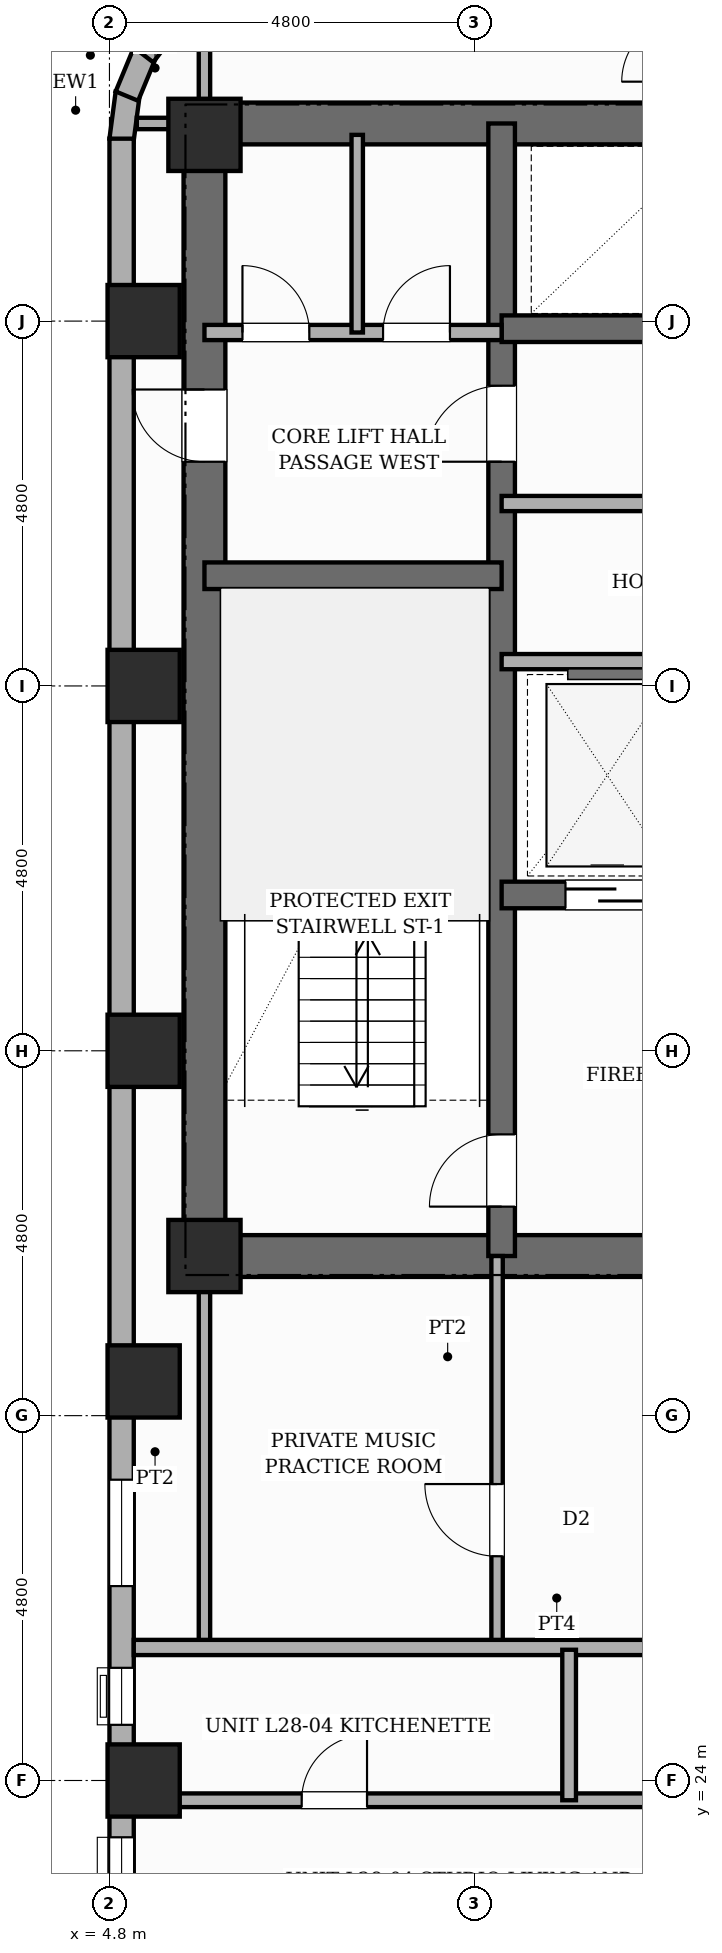
"""IFC4 building model, lengths in metres.
Left out: names, types, materials, properties, quantities, classifications, styles, units other than length and angle.
Written with IfcOpenShell. Run it as: python <this file> out.ifc"""

import sys

from ifc_helpers import new_model, si_unit, direction, frame, frame_2d, origin, origin_2d, place, context, subcontext, project, spatial, rectangle, extrude, element, fill, save


model = new_model("IFC4")
c1 = context("Model", 3, precision=1e-05, world=origin(), true_north=direction((0.0, 1.0)))
c2 = subcontext(c1, "Body", "Model", "MODEL_VIEW")
j1 = project(units=[si_unit("LENGTHUNIT", "METRE"), si_unit("PLANEANGLEUNIT", "RADIAN")], contexts=[c1])
p1 = place(None, origin())
s1 = spatial("IfcSite", under=j1, at=p1, CompositionType="ELEMENT")
p2 = place(p1, origin())
s2 = spatial("IfcBuilding", under=s1, at=p2, CompositionType="ELEMENT")
p3 = place(p2, frame((0.0, 0.0, 110.8)))
s3 = spatial("IfcBuildingStorey", under=s2, at=p3, CompositionType="ELEMENT", Elevation=110.8)
p4 = place(p3, frame((6.05, 30.625, 0.0), z_axis=(0.0, 0.0, 1.0), x_axis=(0.0, 1.0, 0.0)))
e1 = element("IfcWall", 1, at=p4, inside=s3, PredefinedType="SHEAR", context=c2, shape_type="SweptSolid", body=[
    extrude(rectangle(XDim=15.45, YDim=0.55, at=frame_2d((7.725, 0.0))), origin(), (0.0, 0.0, 1.0), 3.6),
])
p5 = place(p4, frame((10.725, 0.0, 0.0)))
e2 = element("IfcOpeningElement", 2, at=p5, cuts=e1, PredefinedType="OPENING", context=c2, shape_type="SweptSolid", body=[
    extrude(rectangle(XDim=0.95, YDim=2.15, at=frame_2d((0.475, 1.075))), frame((0.0, 0.285, 0.0), z_axis=(0.0, -1.0, 0.0), x_axis=(1.0, 0.0, 0.0)), (0.0, 0.0, 1.0), 0.57),
])
p6 = place(p3, frame((6.05, 45.8, 0.0), z_axis=(0.0, 0.0, 1.0), x_axis=(1.0, 0.0, 0.0)))
e3 = element("IfcWall", 3, at=p6, inside=s3, PredefinedType="SHEAR", context=c2, shape_type="SweptSolid", body=[
    extrude(rectangle(XDim=16.7, YDim=0.55, at=frame_2d((8.35, 0.0))), origin(), (0.0, 0.0, 1.0), 3.6),
])
p7 = place(p3, frame((6.05, 30.9, 0.0), z_axis=(0.0, 0.0, 1.0), x_axis=(1.0, 0.0, 0.0)))
e4 = element("IfcWall", 4, at=p7, inside=s3, PredefinedType="SHEAR", context=c2, shape_type="SweptSolid", body=[
    extrude(rectangle(XDim=3.91, YDim=0.55, at=frame_2d((1.955, 0.0))), origin(), (0.0, 0.0, 1.0), 3.6),
])
p8 = place(p3, frame((9.96, 30.9, 0.0), z_axis=(0.0, 0.0, 1.0), x_axis=(1.0, 0.0, 0.0)))
e5 = element("IfcWall", 5, at=p8, inside=s3, PredefinedType="SHEAR", context=c2, shape_type="SweptSolid", body=[
    extrude(rectangle(XDim=8.88, YDim=0.55, at=frame_2d((4.44, 0.0))), origin(), (0.0, 0.0, 1.0), 3.6),
])
p9 = place(p8, frame((4.09, 0.0, 0.0)))
e6 = element("IfcOpeningElement", 6, at=p9, cuts=e5, PredefinedType="OPENING", context=c2, shape_type="SweptSolid", body=[
    extrude(rectangle(XDim=1.0, YDim=2.15, at=frame_2d((0.5, 1.075))), frame((0.0, 0.285, 0.0), z_axis=(0.0, -1.0, 0.0), x_axis=(1.0, 0.0, 0.0)), (0.0, 0.0, 1.0), 0.57),
])
p10 = place(p3, frame((9.96, 30.9, 0.0), z_axis=(0.0, 0.0, 1.0), x_axis=(0.0, 1.0, 0.0)))
e7 = element("IfcWall", 7, at=p10, inside=s3, PredefinedType="SHEAR", context=c2, shape_type="SweptSolid", body=[
    extrude(rectangle(XDim=14.9, YDim=0.35, at=frame_2d((7.45, 0.0))), origin(), (0.0, 0.0, 1.0), 3.6),
])
p11 = place(p10, frame((0.65, 0.0, 0.0)))
e8 = element("IfcOpeningElement", 8, at=p11, cuts=e7, PredefinedType="OPENING", context=c2, shape_type="SweptSolid", body=[
    extrude(rectangle(XDim=0.95, YDim=2.1, at=frame_2d((0.475, 1.05))), frame((0.0, 0.185, 0.0), z_axis=(0.0, -1.0, 0.0), x_axis=(1.0, 0.0, 0.0)), (0.0, 0.0, 1.0), 0.37),
])
p12 = place(p10, frame((10.45, 0.0, 0.0)))
e9 = element("IfcOpeningElement", 9, at=p12, cuts=e7, PredefinedType="OPENING", context=c2, shape_type="SweptSolid", body=[
    extrude(rectangle(XDim=1.0, YDim=2.15, at=frame_2d((0.5, 1.075))), frame((0.0, 0.185, 0.0), z_axis=(0.0, -1.0, 0.0), x_axis=(1.0, 0.0, 0.0)), (0.0, 0.0, 1.0), 0.37),
])
p13 = place(p3, frame((6.05, 39.85, 0.0), z_axis=(0.0, 0.0, 1.0), x_axis=(1.0, 0.0, 0.0)))
e10 = element("IfcWall", 10, at=p13, inside=s3, PredefinedType="SHEAR", context=c2, shape_type="SweptSolid", body=[
    extrude(rectangle(XDim=3.91, YDim=0.35, at=frame_2d((1.955, 0.0))), origin(), (0.0, 0.0, 1.0), 3.6),
])
p14 = place(p3, frame((9.96, 35.65, 0.0), z_axis=(0.0, 0.0, 1.0), x_axis=(1.0, 0.0, 0.0)))
e11 = element("IfcWall", 11, at=p14, inside=s3, PredefinedType="SHEAR", context=c2, shape_type="SweptSolid", body=[
    extrude(rectangle(XDim=8.88, YDim=0.35, at=frame_2d((4.44, 0.0))), origin(), (0.0, 0.0, 1.0), 3.6),
])
p15 = place(p14, frame((0.84, 0.0, 0.0)))
e12 = element("IfcOpeningElement", 12, at=p15, cuts=e11, PredefinedType="OPENING", context=c2, shape_type="SweptSolid", body=[
    extrude(rectangle(XDim=1.1, YDim=2.15, at=frame_2d((0.55, 1.075))), frame((0.0, 0.185, 0.0), z_axis=(0.0, -1.0, 0.0), x_axis=(1.0, 0.0, 0.0)), (0.0, 0.0, 1.0), 0.37),
])
p16 = place(p14, frame((5.24, 0.0, 0.0)))
e13 = element("IfcOpeningElement", 13, at=p16, cuts=e11, PredefinedType="OPENING", context=c2, shape_type="SweptSolid", body=[
    extrude(rectangle(XDim=1.1, YDim=2.15, at=frame_2d((0.55, 1.075))), frame((0.0, 0.185, 0.0), z_axis=(0.0, -1.0, 0.0), x_axis=(1.0, 0.0, 0.0)), (0.0, 0.0, 1.0), 0.37),
])
p17 = place(p14, frame((7.5, 0.0, 0.0)))
e14 = element("IfcOpeningElement", 14, at=p17, cuts=e11, PredefinedType="OPENING", context=c2, shape_type="SweptSolid", body=[
    extrude(rectangle(XDim=0.88, YDim=2.1, at=frame_2d((0.44, 1.05))), frame((0.0, 0.185, 0.0), z_axis=(0.0, -1.0, 0.0), x_axis=(1.0, 0.0, 0.0)), (0.0, 0.0, 1.0), 0.37),
])
p18 = place(p3, frame((9.96, 43.1, 0.0), z_axis=(0.0, 0.0, 1.0), x_axis=(1.0, 0.0, 0.0)))
e15 = element("IfcWall", 15, at=p18, inside=s3, PredefinedType="SHEAR", context=c2, shape_type="SweptSolid", body=[
    extrude(rectangle(XDim=8.88, YDim=0.35, at=frame_2d((4.44, 0.0))), origin(), (0.0, 0.0, 1.0), 3.6),
])
for number, where, z_axis, x_axis in (
    (16, (5.25, 24.0, 0.0), (0.0, 0.0, 1.0), (1.0, 0.0, 0.0)),
    (17, (5.25, 29.25, 0.0), (0.0, 0.0, 1.0), (1.0, 0.0, 0.0)),
    (18, (5.25, 33.6, 0.0), (0.0, 0.0, 1.0), (1.0, 0.0, 0.0)),
    (19, (5.25, 38.4, 0.0), (0.0, 0.0, 1.0), (1.0, 0.0, 0.0)),
    (20, (5.25, 43.2, 0.0), (0.0, 0.0, 1.0), (1.0, 0.0, 0.0)),
    (21, (6.05, 30.9, 0.0), (0.0, 0.0, 1.0), (1.0, 0.0, 0.0)),
    (22, (6.05, 45.65, 0.0), (0.0, 0.0, 1.0), (1.0, 0.0, 0.0)),
):
    element("IfcColumn", number, at=place(p3, frame(where, z_axis=z_axis, x_axis=x_axis)), inside=s3, PredefinedType="COLUMN", context=c2, shape_type="SweptSolid", body=[
        extrude(rectangle(XDim=0.95, YDim=0.95, at=origin_2d()), origin(), (0.0, 0.0, 1.0), 3.6),
    ])
for number, where, z_axis, x_axis in (
    (23, (4.958, 45.579, 0.0), (0.0, 0.0, 1.0), (0.131, 0.991, 0.0)),
    (24, (5.03, 46.16, 0.0), (0.0, 0.0, 1.0), (0.383, 0.924, 0.0)),
):
    element("IfcWall", number, at=place(p3, frame(where, z_axis=z_axis, x_axis=x_axis)), inside=s3, PredefinedType="STANDARD", context=c2, shape_type="SweptSolid", body=[
        extrude(rectangle(XDim=0.626, YDim=0.32, at=frame_2d((0.313, 0.0))), origin(), (0.0, 0.0, 1.0), 3.36),
    ])
p19 = place(p3, frame((5.248, 46.703, 0.0), z_axis=(0.0, 0.0, 1.0), x_axis=(0.608938521285, 0.7932174212, 0.0)))
e25 = element("IfcWall", 25, at=p19, inside=s3, PredefinedType="STANDARD", context=c2, shape_type="SweptSolid", body=[
    extrude(rectangle(XDim=0.627, YDim=0.32, at=frame_2d((0.313, 0.0))), origin(), (0.0, 0.0, 1.0), 3.36),
])
p20 = place(p3, frame((4.96, 12.0, 0.0), z_axis=(0.0, 0.0, 1.0), x_axis=(0.0, 1.0, 0.0)))
e26 = element("IfcWall", 26, at=p20, inside=s3, PredefinedType="STANDARD", context=c2, shape_type="SweptSolid", body=[
    extrude(rectangle(XDim=33.6, YDim=0.32, at=frame_2d((16.8, 0.0))), origin(), (0.0, 0.0, 1.0), 2.54),
])
p21 = place(p20, frame((4.25, 0.0, 0.0)))
e27 = element("IfcOpeningElement", 27, at=p21, cuts=e26, PredefinedType="OPENING", context=c2, shape_type="SweptSolid", body=[
    extrude(rectangle(XDim=1.1, YDim=2.15, at=frame_2d((0.55, 1.075))), frame((0.0, 0.17, 0.0), z_axis=(0.0, -1.0, 0.0), x_axis=(1.0, 0.0, 0.0)), (0.0, 0.0, 1.0), 0.34),
])
p22 = place(p20, frame((3.153, 0.0, 0.45)))
e28 = element("IfcOpeningElement", 28, at=p22, cuts=e26, PredefinedType="OPENING", context=c2, shape_type="SweptSolid", body=[
    extrude(rectangle(XDim=0.6, YDim=1.8, at=frame_2d((0.3, 0.9))), frame((0.0, 0.17, 0.0), z_axis=(0.0, -1.0, 0.0), x_axis=(1.0, 0.0, 0.0)), (0.0, 0.0, 1.0), 0.34),
])
p23 = place(p20, frame((5.853, 0.0, 0.45)))
e29 = element("IfcOpeningElement", 29, at=p23, cuts=e26, PredefinedType="OPENING", context=c2, shape_type="SweptSolid", body=[
    extrude(rectangle(XDim=0.6, YDim=1.8, at=frame_2d((0.3, 0.9))), frame((0.0, 0.17, 0.0), z_axis=(0.0, -1.0, 0.0), x_axis=(1.0, 0.0, 0.0)), (0.0, 0.0, 1.0), 0.34),
])
p24 = place(p20, frame((9.853, 0.0, 0.65)))
e30 = element("IfcOpeningElement", 30, at=p24, cuts=e26, PredefinedType="OPENING", context=c2, shape_type="SweptSolid", body=[
    extrude(rectangle(XDim=1.4, YDim=1.1, at=frame_2d((0.7, 0.55))), frame((0.0, 0.17, 0.0), z_axis=(0.0, -1.0, 0.0), x_axis=(1.0, 0.0, 0.0)), (0.0, 0.0, 1.0), 0.34),
])
p25 = place(p20, frame((0.355, 0.0, 0.45)))
e31 = element("IfcOpeningElement", 31, at=p25, cuts=e26, PredefinedType="OPENING", context=c2, shape_type="SweptSolid", body=[
    extrude(rectangle(XDim=0.95, YDim=1.8, at=frame_2d((0.475, 0.9))), frame((0.0, 0.17, 0.0), z_axis=(0.0, -1.0, 0.0), x_axis=(1.0, 0.0, 0.0)), (0.0, 0.0, 1.0), 0.34),
])
p26 = place(p20, frame((8.33, 0.0, 0.45)))
e32 = element("IfcOpeningElement", 32, at=p26, cuts=e26, PredefinedType="OPENING", context=c2, shape_type="SweptSolid", body=[
    extrude(rectangle(XDim=0.95, YDim=1.8, at=frame_2d((0.475, 0.9))), frame((0.0, 0.17, 0.0), z_axis=(0.0, -1.0, 0.0), x_axis=(1.0, 0.0, 0.0)), (0.0, 0.0, 1.0), 0.34),
])
p27 = place(p20, frame((12.732, 0.0, 0.45)))
e33 = element("IfcOpeningElement", 33, at=p27, cuts=e26, PredefinedType="OPENING", context=c2, shape_type="SweptSolid", body=[
    extrude(rectangle(XDim=0.75, YDim=1.8, at=frame_2d((0.375, 0.9))), frame((0.0, 0.17, 0.0), z_axis=(0.0, -1.0, 0.0), x_axis=(1.0, 0.0, 0.0)), (0.0, 0.0, 1.0), 0.34),
])
p28 = place(p20, frame((14.558, 0.0, 0.65)))
e34 = element("IfcOpeningElement", 34, at=p28, cuts=e26, PredefinedType="OPENING", context=c2, shape_type="SweptSolid", body=[
    extrude(rectangle(XDim=1.4, YDim=1.1, at=frame_2d((0.7, 0.55))), frame((0.0, 0.17, 0.0), z_axis=(0.0, -1.0, 0.0), x_axis=(1.0, 0.0, 0.0)), (0.0, 0.0, 1.0), 0.34),
])
p29 = place(p3, frame((9.96, 38.72, 0.0), z_axis=(0.0, 0.0, 1.0), x_axis=(1.0, 0.0, 0.0)))
e35 = element("IfcWall", 35, at=p29, inside=s3, PredefinedType="POLYGONAL", context=c2, shape_type="SweptSolid", body=[
    extrude(rectangle(XDim=7.06, YDim=0.2, at=frame_2d((3.53, 0.0))), origin(), (0.0, 0.0, 1.0), 3.36),
])
p30 = place(p3, frame((9.96, 40.8, 0.0), z_axis=(0.0, 0.0, 1.0), x_axis=(1.0, 0.0, 0.0)))
e36 = element("IfcWall", 36, at=p30, inside=s3, PredefinedType="POLYGONAL", context=c2, shape_type="SweptSolid", body=[
    extrude(rectangle(XDim=8.88, YDim=0.2, at=frame_2d((4.44, 0.0))), origin(), (0.0, 0.0, 1.0), 3.36),
])
p31 = place(p30, frame((7.5, 0.0, 0.0)))
e37 = element("IfcOpeningElement", 37, at=p31, cuts=e36, PredefinedType="OPENING", context=c2, shape_type="SweptSolid", body=[
    extrude(rectangle(XDim=0.88, YDim=2.1, at=frame_2d((0.44, 1.05))), frame((0.0, 0.11, 0.0), z_axis=(0.0, -1.0, 0.0), x_axis=(1.0, 0.0, 0.0)), (0.0, 0.0, 1.0), 0.22),
])
p32 = place(p30, frame((3.6, 0.0, 0.0)))
e38 = element("IfcOpeningElement", 38, at=p32, cuts=e36, PredefinedType="OPENING", context=c2, shape_type="SweptSolid", body=[
    extrude(rectangle(XDim=0.88, YDim=2.1, at=frame_2d((0.44, 1.05))), frame((0.0, 0.11, 0.0), z_axis=(0.0, -1.0, 0.0), x_axis=(1.0, 0.0, 0.0)), (0.0, 0.0, 1.0), 0.22),
])
p33 = place(p3, frame((6.05, 43.05, 0.0), z_axis=(0.0, 0.0, 1.0), x_axis=(1.0, 0.0, 0.0)))
e39 = element("IfcWall", 39, at=p33, inside=s3, PredefinedType="POLYGONAL", context=c2, shape_type="SweptSolid", body=[
    extrude(rectangle(XDim=3.91, YDim=0.2, at=frame_2d((1.955, 0.0))), origin(), (0.0, 0.0, 1.0), 2.54),
])
p34 = place(p33, frame((0.5, 0.0, 0.0)))
e40 = element("IfcOpeningElement", 40, at=p34, cuts=e39, PredefinedType="OPENING", context=c2, shape_type="SweptSolid", body=[
    extrude(rectangle(XDim=0.88, YDim=2.1, at=frame_2d((0.44, 1.05))), frame((0.0, 0.11, 0.0), z_axis=(0.0, -1.0, 0.0), x_axis=(1.0, 0.0, 0.0)), (0.0, 0.0, 1.0), 0.22),
])
p35 = place(p33, frame((2.35, 0.0, 0.0)))
e41 = element("IfcOpeningElement", 41, at=p35, cuts=e39, PredefinedType="OPENING", context=c2, shape_type="SweptSolid", body=[
    extrude(rectangle(XDim=0.88, YDim=2.1, at=frame_2d((0.44, 1.05))), frame((0.0, 0.11, 0.0), z_axis=(0.0, -1.0, 0.0), x_axis=(1.0, 0.0, 0.0)), (0.0, 0.0, 1.0), 0.22),
])
p36 = place(p3, frame((8.06, 43.05, 0.0), z_axis=(0.0, 0.0, 1.0), x_axis=(0.0, 1.0, 0.0)))
e42 = element("IfcWall", 42, at=p36, inside=s3, PredefinedType="PARTITIONING", context=c2, shape_type="SweptSolid", body=[
    extrude(rectangle(XDim=2.6, YDim=0.15, at=frame_2d((1.3, 0.0))), origin(), (0.0, 0.0, 1.0), 3.36),
])
p37 = place(p3, frame((6.05, 25.75, 0.0), z_axis=(0.0, 0.0, 1.0), x_axis=(0.0, 1.0, 0.0)))
e43 = element("IfcWall", 43, at=p37, inside=s3, PredefinedType="PARTITIONING", context=c2, shape_type="SweptSolid", body=[
    extrude(rectangle(XDim=5.15, YDim=0.15, at=frame_2d((2.575, 0.0))), origin(), (0.0, 0.0, 1.0), 3.36),
])
p38 = place(p3, frame((9.9, 25.75, 0.0), z_axis=(0.0, 0.0, 1.0), x_axis=(0.0, 1.0, 0.0)))
e44 = element("IfcWall", 44, at=p38, inside=s3, PredefinedType="PARTITIONING", context=c2, shape_type="SweptSolid", body=[
    extrude(rectangle(XDim=5.15, YDim=0.15, at=frame_2d((2.575, 0.0))), origin(), (0.0, 0.0, 1.0), 3.36),
])
p39 = place(p38, frame((1.2, 0.0, 0.0)))
e45 = element("IfcOpeningElement", 45, at=p39, cuts=e44, PredefinedType="OPENING", context=c2, shape_type="SweptSolid", body=[
    extrude(rectangle(XDim=0.95, YDim=2.15, at=frame_2d((0.475, 1.075))), frame((0.0, 0.085, 0.0), z_axis=(0.0, -1.0, 0.0), x_axis=(1.0, 0.0, 0.0)), (0.0, 0.0, 1.0), 0.17),
])
p40 = place(p3, frame((5.12, 25.75, 0.0), z_axis=(0.0, 0.0, 1.0), x_axis=(1.0, 0.0, 0.0)))
e46 = element("IfcWall", 46, at=p40, inside=s3, PredefinedType="PARTITIONING", context=c2, shape_type="SweptSolid", body=[
    extrude(rectangle(XDim=11.13, YDim=0.2, at=frame_2d((5.565, 0.0))), origin(), (0.0, 0.0, 1.0), 3.36),
])
p41 = place(p3, frame((5.12, 23.74, 0.0), z_axis=(0.0, 0.0, 1.0), x_axis=(1.0, 0.0, 0.0)))
e47 = element("IfcWall", 47, at=p41, inside=s3, PredefinedType="PLUMBINGWALL", context=c2, shape_type="SweptSolid", body=[
    extrude(rectangle(XDim=11.07, YDim=0.18, at=frame_2d((5.535, 0.0))), origin(), (0.0, 0.0, 1.0), 2.54),
])
p42 = place(p41, frame((2.209, 0.0, 0.0)))
e48 = element("IfcOpeningElement", 48, at=p42, cuts=e47, PredefinedType="OPENING", context=c2, shape_type="SweptSolid", body=[
    extrude(rectangle(XDim=0.86, YDim=2.1, at=frame_2d((0.43, 1.05))), frame((0.0, 0.1, 0.0), z_axis=(0.0, -1.0, 0.0), x_axis=(1.0, 0.0, 0.0)), (0.0, 0.0, 1.0), 0.2),
])
p43 = place(p41, frame((7.824, 0.0, 0.0)))
e49 = element("IfcOpeningElement", 49, at=p43, cuts=e47, PredefinedType="OPENING", context=c2, shape_type="SweptSolid", body=[
    extrude(rectangle(XDim=0.86, YDim=2.1, at=frame_2d((0.43, 1.05))), frame((0.0, 0.1, 0.0), z_axis=(0.0, -1.0, 0.0), x_axis=(1.0, 0.0, 0.0)), (0.0, 0.0, 1.0), 0.2),
])
p44 = place(p3, frame((10.848, 23.74, 0.0), z_axis=(0.0, 0.0, 1.0), x_axis=(0.0, 1.0, 0.0)))
e50 = element("IfcWall", 50, at=p44, inside=s3, PredefinedType="PLUMBINGWALL", context=c2, shape_type="SweptSolid", body=[
    extrude(rectangle(XDim=1.98, YDim=0.18, at=frame_2d((0.99, 0.0))), origin(), (0.0, 0.0, 1.0), 3.36),
])
p45 = place(p3, frame((5.16, 45.8, 0.0), z_axis=(0.0, 0.0, 1.0), x_axis=(1.0, 0.0, 0.0)))
e51 = element("IfcWall", 51, at=p45, inside=s3, PredefinedType="PARTITIONING", context=c2, shape_type="SweptSolid", body=[
    extrude(rectangle(XDim=0.89, YDim=0.15, at=frame_2d((0.445, 0.0))), origin(), (0.0, 0.0, 1.0), 3.36),
])
p46 = place(p3, frame((6.05, 45.8, 0.0), z_axis=(0.0, 0.0, 1.0), x_axis=(0.0, 1.0, 0.0)))
e52 = element("IfcWall", 52, at=p46, inside=s3, PredefinedType="PARTITIONING", context=c2, shape_type="SweptSolid", body=[
    extrude(rectangle(XDim=1.46, YDim=0.15, at=frame_2d((0.73, 0.0))), origin(), (0.0, 0.0, 1.0), 3.36),
])
p47 = place(p24, origin())
e53 = element("IfcWindow", 53, at=p47, inside=s3, PartitioningType="SINGLE_PANEL", PredefinedType="WINDOW", context=c2, shape_type="SweptSolid", body=[
    extrude(rectangle(XDim=1.4, YDim=1.1, at=frame_2d((0.7, 0.55))), frame((0.0, 0.03, 0.0), z_axis=(0.0, -1.0, 0.0), x_axis=(1.0, 0.0, 0.0)), (0.0, 0.0, 1.0), 0.06),
])
fill(e30, e53)
p48 = place(p27, origin())
e54 = element("IfcWindow", 54, at=p48, inside=s3, PartitioningType="SINGLE_PANEL", PredefinedType="WINDOW", context=c2, shape_type="SweptSolid", body=[
    extrude(rectangle(XDim=0.75, YDim=1.8, at=frame_2d((0.375, 0.9))), frame((0.0, 0.03, 0.0), z_axis=(0.0, -1.0, 0.0), x_axis=(1.0, 0.0, 0.0)), (0.0, 0.0, 1.0), 0.06),
])
fill(e33, e54)
p49 = place(p28, origin())
e55 = element("IfcWindow", 55, at=p49, inside=s3, PartitioningType="SINGLE_PANEL", PredefinedType="WINDOW", context=c2, shape_type="SweptSolid", body=[
    extrude(rectangle(XDim=1.4, YDim=1.1, at=frame_2d((0.7, 0.55))), frame((0.0, 0.03, 0.0), z_axis=(0.0, -1.0, 0.0), x_axis=(1.0, 0.0, 0.0)), (0.0, 0.0, 1.0), 0.06),
])
fill(e34, e55)
p50 = place(p11, origin())
e56 = element("IfcDoor", 56, at=p50, inside=s3, OperationType="SINGLE_SWING_LEFT", PredefinedType="DOOR", context=c2, shape_type="SweptSolid", body=[
    extrude(rectangle(XDim=0.95, YDim=2.1, at=frame_2d((0.475, 1.05))), frame((0.0, 0.025, 0.0), z_axis=(0.0, -1.0, 0.0), x_axis=(1.0, 0.0, 0.0)), (0.0, 0.0, 1.0), 0.05),
])
fill(e8, e56)
p51 = place(p15, origin())
e57 = element("IfcDoor", 57, at=p51, inside=s3, OperationType="SLIDING_TO_LEFT", PredefinedType="DOOR", context=c2, shape_type="SweptSolid", body=[
    extrude(rectangle(XDim=1.1, YDim=2.15, at=frame_2d((0.55, 1.075))), frame((0.0, 0.025, 0.0), z_axis=(0.0, -1.0, 0.0), x_axis=(1.0, 0.0, 0.0)), (0.0, 0.0, 1.0), 0.05),
])
fill(e12, e57)
p52 = place(p12, origin())
e58 = element("IfcDoor", 58, at=p52, inside=s3, OperationType="SINGLE_SWING_LEFT", PredefinedType="DOOR", context=c2, shape_type="SweptSolid", body=[
    extrude(rectangle(XDim=1.0, YDim=2.15, at=frame_2d((0.5, 1.075))), frame((0.0, 0.025, 0.0), z_axis=(0.0, -1.0, 0.0), x_axis=(1.0, 0.0, 0.0)), (0.0, 0.0, 1.0), 0.05),
])
fill(e9, e58)
p53 = place(p5, origin())
e59 = element("IfcDoor", 59, at=p53, inside=s3, OperationType="SINGLE_SWING_RIGHT", PredefinedType="DOOR", context=c2, shape_type="SweptSolid", body=[
    extrude(rectangle(XDim=0.95, YDim=2.15, at=frame_2d((0.475, 1.075))), frame((0.0, 0.025, 0.0), z_axis=(0.0, -1.0, 0.0), x_axis=(1.0, 0.0, 0.0)), (0.0, 0.0, 1.0), 0.05),
])
fill(e2, e59)
p54 = place(p34, origin())
e60 = element("IfcDoor", 60, at=p54, inside=s3, OperationType="SINGLE_SWING_LEFT", PredefinedType="DOOR", context=c2, shape_type="SweptSolid", body=[
    extrude(rectangle(XDim=0.88, YDim=2.1, at=frame_2d((0.44, 1.05))), frame((0.0, 0.025, 0.0), z_axis=(0.0, -1.0, 0.0), x_axis=(1.0, 0.0, 0.0)), (0.0, 0.0, 1.0), 0.05),
])
fill(e40, e60)
p55 = place(p35, origin())
e61 = element("IfcDoor", 61, at=p55, inside=s3, OperationType="SINGLE_SWING_RIGHT", PredefinedType="DOOR", context=c2, shape_type="SweptSolid", body=[
    extrude(rectangle(XDim=0.88, YDim=2.1, at=frame_2d((0.44, 1.05))), frame((0.0, 0.025, 0.0), z_axis=(0.0, -1.0, 0.0), x_axis=(1.0, 0.0, 0.0)), (0.0, 0.0, 1.0), 0.05),
])
fill(e41, e61)
p56 = place(p39, origin())
e62 = element("IfcDoor", 62, at=p56, inside=s3, OperationType="SINGLE_SWING_RIGHT", PredefinedType="DOOR", context=c2, shape_type="SweptSolid", body=[
    extrude(rectangle(XDim=0.95, YDim=2.15, at=frame_2d((0.475, 1.075))), frame((0.0, 0.025, 0.0), z_axis=(0.0, -1.0, 0.0), x_axis=(1.0, 0.0, 0.0)), (0.0, 0.0, 1.0), 0.05),
])
fill(e45, e62)
p57 = place(p42, origin())
e63 = element("IfcDoor", 63, at=p57, inside=s3, OperationType="SINGLE_SWING_RIGHT", PredefinedType="DOOR", context=c2, shape_type="SweptSolid", body=[
    extrude(rectangle(XDim=0.86, YDim=2.1, at=frame_2d((0.43, 1.05))), frame((0.0, 0.025, 0.0), z_axis=(0.0, -1.0, 0.0), x_axis=(1.0, 0.0, 0.0)), (0.0, 0.0, 1.0), 0.05),
])
fill(e48, e63)
save(model, sys.argv[1])
